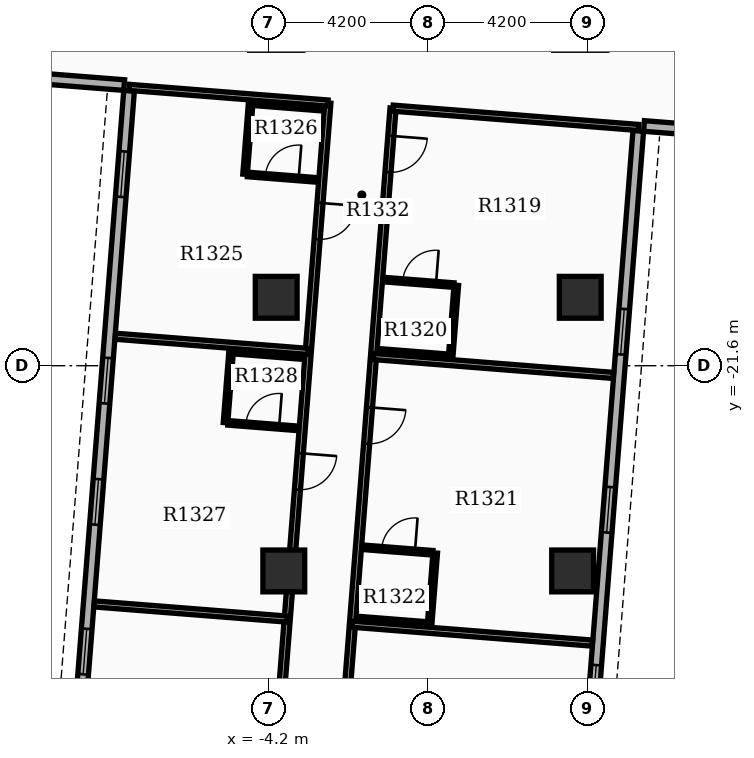
"""IFC4 building model, lengths in metres.
Left out: names, types, materials, properties, quantities, classifications, styles, units other than length and angle.
Written with IfcOpenShell. Run it as: python <this file> out.ifc"""

import sys

from ifc_helpers import new_model, si_unit, direction, frame, frame_2d, origin, origin_2d, place, context, subcontext, project, spatial, rectangle, extrude, element, fill, save


model = new_model("IFC4")
c1 = context("Model", 3, precision=1e-05, world=origin(), true_north=direction((0.0, 1.0)))
c2 = subcontext(c1, "Body", "Model", "MODEL_VIEW")
j1 = project(units=[si_unit("LENGTHUNIT", "METRE"), si_unit("PLANEANGLEUNIT", "RADIAN")], contexts=[c1])
p1 = place(None, origin())
s1 = spatial("IfcSite", under=j1, at=p1, CompositionType="ELEMENT")
p2 = place(p1, origin())
s2 = spatial("IfcBuilding", under=s1, at=p2, CompositionType="ELEMENT")
p3 = place(p2, frame((0.0, 0.0, 83.4)))
s3 = spatial("IfcBuildingStorey", under=s2, at=p3, CompositionType="ELEMENT", Elevation=83.4)
for number, where, z_axis, x_axis in (
    (1, (-4.0, -19.8, 0.0), (0.0, 0.0, 1.0), (1.0, 0.0, 0.0)),
    (2, (4.0, -19.8, 0.0), (0.0, 0.0, 1.0), (1.0, 0.0, 0.0)),
    (3, (-3.8, -27.0, 0.0), (0.0, 0.0, 1.0), (1.0, 0.0, 0.0)),
    (4, (3.8, -27.0, 0.0), (0.0, 0.0, 1.0), (1.0, 0.0, 0.0)),
):
    element("IfcColumn", number, at=place(p3, frame(where, z_axis=z_axis, x_axis=x_axis)), inside=s3, PredefinedType="COLUMN", context=c2, shape_type="SweptSolid", body=[
        extrude(rectangle(XDim=1.1, YDim=1.1, at=origin_2d()), origin(), (0.0, 0.0, 1.0), 3.9),
    ])
p4 = place(p3, frame((-7.872, -14.367, 0.0), z_axis=(0.0, 0.0, 1.0), x_axis=(-0.078452802979, -0.996917828963, 0.0)))
e5 = element("IfcWall", 5, at=p4, inside=s3, PredefinedType="STANDARD", context=c2, shape_type="SweptSolid", body=[
    extrude(rectangle(XDim=20.1, YDim=0.28, at=frame_2d((10.05, 0.0))), origin(), (0.0, 0.0, 1.0), 2.91),
])
p5 = place(p4, frame((1.6, 0.0, 0.8)))
e6 = element("IfcOpeningElement", 6, at=p5, cuts=e5, PredefinedType="OPENING", context=c2, shape_type="SweptSolid", body=[
    extrude(rectangle(XDim=1.2, YDim=1.6, at=frame_2d((0.6, 0.8))), frame((0.0, 0.15, 0.0), z_axis=(0.0, -1.0, 0.0), x_axis=(1.0, 0.0, 0.0)), (0.0, 0.0, 1.0), 0.3),
])
p6 = place(p4, frame((7.05, 0.0, 0.8)))
e7 = element("IfcOpeningElement", 7, at=p6, cuts=e5, PredefinedType="OPENING", context=c2, shape_type="SweptSolid", body=[
    extrude(rectangle(XDim=1.2, YDim=1.6, at=frame_2d((0.6, 0.8))), frame((0.0, 0.15, 0.0), z_axis=(0.0, -1.0, 0.0), x_axis=(1.0, 0.0, 0.0)), (0.0, 0.0, 1.0), 0.3),
])
p7 = place(p4, frame((10.25, 0.0, 0.8)))
e8 = element("IfcOpeningElement", 8, at=p7, cuts=e5, PredefinedType="OPENING", context=c2, shape_type="SweptSolid", body=[
    extrude(rectangle(XDim=1.2, YDim=1.6, at=frame_2d((0.6, 0.8))), frame((0.0, 0.15, 0.0), z_axis=(0.0, -1.0, 0.0), x_axis=(1.0, 0.0, 0.0)), (0.0, 0.0, 1.0), 0.3),
])
p8 = place(p4, frame((14.2, 0.0, 0.8)))
e9 = element("IfcOpeningElement", 9, at=p8, cuts=e5, PredefinedType="OPENING", context=c2, shape_type="SweptSolid", body=[
    extrude(rectangle(XDim=1.2, YDim=1.6, at=frame_2d((0.6, 0.8))), frame((0.0, 0.15, 0.0), z_axis=(0.0, -1.0, 0.0), x_axis=(1.0, 0.0, 0.0)), (0.0, 0.0, 1.0), 0.3),
])
p9 = place(p3, frame((3.95, -35.459, 0.0), z_axis=(0.0, 0.0, 1.0), x_axis=(0.078452802979, 0.996917828963, 0.0)))
e10 = element("IfcWall", 10, at=p9, inside=s3, PredefinedType="STANDARD", context=c2, shape_type="SweptSolid", body=[
    extrude(rectangle(XDim=20.1, YDim=0.28, at=frame_2d((10.05, 0.0))), origin(), (0.0, 0.0, 1.0), 2.91),
])
p10 = place(p9, frame((1.6, 0.0, 0.8)))
e11 = element("IfcOpeningElement", 11, at=p10, cuts=e10, PredefinedType="OPENING", context=c2, shape_type="SweptSolid", body=[
    extrude(rectangle(XDim=1.2, YDim=1.6, at=frame_2d((0.6, 0.8))), frame((0.0, 0.15, 0.0), z_axis=(0.0, -1.0, 0.0), x_axis=(1.0, 0.0, 0.0)), (0.0, 0.0, 1.0), 0.3),
])
p11 = place(p9, frame((4.8, 0.0, 0.8)))
e12 = element("IfcOpeningElement", 12, at=p11, cuts=e10, PredefinedType="OPENING", context=c2, shape_type="SweptSolid", body=[
    extrude(rectangle(XDim=1.2, YDim=1.6, at=frame_2d((0.6, 0.8))), frame((0.0, 0.15, 0.0), z_axis=(0.0, -1.0, 0.0), x_axis=(1.0, 0.0, 0.0)), (0.0, 0.0, 1.0), 0.3),
])
p12 = place(p9, frame((9.5, 0.0, 0.8)))
e13 = element("IfcOpeningElement", 13, at=p12, cuts=e10, PredefinedType="OPENING", context=c2, shape_type="SweptSolid", body=[
    extrude(rectangle(XDim=1.2, YDim=1.6, at=frame_2d((0.6, 0.8))), frame((0.0, 0.15, 0.0), z_axis=(0.0, -1.0, 0.0), x_axis=(1.0, 0.0, 0.0)), (0.0, 0.0, 1.0), 0.3),
])
p13 = place(p9, frame((14.2, 0.0, 0.8)))
e14 = element("IfcOpeningElement", 14, at=p13, cuts=e10, PredefinedType="OPENING", context=c2, shape_type="SweptSolid", body=[
    extrude(rectangle(XDim=1.2, YDim=1.6, at=frame_2d((0.6, 0.8))), frame((0.0, 0.15, 0.0), z_axis=(0.0, -1.0, 0.0), x_axis=(1.0, 0.0, 0.0)), (0.0, 0.0, 1.0), 0.3),
])
p14 = place(p3, frame((-14.281, -13.722, 0.0), z_axis=(0.0, 0.0, 1.0), x_axis=(0.99691915642, -0.078435932851, 0.0)))
e15 = element("IfcWall", 15, at=p14, inside=s3, PredefinedType="STANDARD", context=c2, shape_type="SweptSolid", body=[
    extrude(rectangle(XDim=6.3, YDim=0.28, at=frame_2d((3.15, 0.0))), origin(), (0.0, 0.0, 1.0), 2.91),
])
p15 = place(p3, frame((11.958, -15.787, 0.0), z_axis=(0.0, 0.0, 1.0), x_axis=(-0.996916125428, 0.078474447191, 0.0)))
e16 = element("IfcWall", 16, at=p15, inside=s3, PredefinedType="STANDARD", context=c2, shape_type="SweptSolid", body=[
    extrude(rectangle(XDim=6.3, YDim=0.28, at=frame_2d((3.15, 0.0))), origin(), (0.0, 0.0, 1.0), 2.91),
])
p16 = place(p3, frame((-0.926, -14.823, 0.0), z_axis=(0.0, 0.0, 1.0), x_axis=(-0.078460461943, -0.996917226209, 0.0)))
e17 = element("IfcWall", 17, at=p16, inside=s3, PredefinedType="PARTITIONING", context=c2, shape_type="SweptSolid", body=[
    extrude(rectangle(XDim=20.182, YDim=0.16, at=frame_2d((10.091, 0.0))), origin(), (0.0, 0.0, 1.0), 2.9),
])
p17 = place(p16, frame((0.731, 0.0, 0.0)))
e18 = element("IfcOpeningElement", 18, at=p17, cuts=e17, PredefinedType="OPENING", context=c2, shape_type="SweptSolid", body=[
    extrude(rectangle(XDim=0.96, YDim=2.15, at=frame_2d((0.48, 1.075))), frame((0.0, 0.09, 0.0), z_axis=(0.0, -1.0, 0.0), x_axis=(1.0, 0.0, 0.0)), (0.0, 0.0, 1.0), 0.18),
])
p18 = place(p16, frame((7.896, 0.0, 0.0)))
e19 = element("IfcOpeningElement", 19, at=p18, cuts=e17, PredefinedType="OPENING", context=c2, shape_type="SweptSolid", body=[
    extrude(rectangle(XDim=0.96, YDim=2.15, at=frame_2d((0.48, 1.075))), frame((0.0, 0.09, 0.0), z_axis=(0.0, -1.0, 0.0), x_axis=(1.0, 0.0, 0.0)), (0.0, 0.0, 1.0), 0.18),
])
p19 = place(p16, frame((16.611, 0.0, 0.0)))
e20 = element("IfcOpeningElement", 20, at=p19, cuts=e17, PredefinedType="OPENING", context=c2, shape_type="SweptSolid", body=[
    extrude(rectangle(XDim=0.96, YDim=2.15, at=frame_2d((0.48, 1.075))), frame((0.0, 0.09, 0.0), z_axis=(0.0, -1.0, 0.0), x_axis=(1.0, 0.0, 0.0)), (0.0, 0.0, 1.0), 0.18),
])
p20 = place(p3, frame((-0.926, -14.823, 0.0), z_axis=(0.0, 0.0, 1.0), x_axis=(0.99691570434, -0.078479796377, 0.0)))
e21 = element("IfcWall", 21, at=p20, inside=s3, PredefinedType="PARTITIONING", context=c2, shape_type="SweptSolid", body=[
    extrude(rectangle(XDim=6.48, YDim=0.16, at=frame_2d((3.24, 0.0))), origin(), (0.0, 0.0, 1.0), 2.9),
])
p21 = place(p3, frame((-1.44, -21.359, 0.0), z_axis=(0.0, 0.0, 1.0), x_axis=(0.996917066323, -0.078462493424, 0.0)))
e22 = element("IfcWall", 22, at=p21, inside=s3, PredefinedType="PARTITIONING", context=c2, shape_type="SweptSolid", body=[
    extrude(rectangle(XDim=6.332, YDim=0.16, at=frame_2d((3.166, 0.0))), origin(), (0.0, 0.0, 1.0), 2.9),
])
p22 = place(p3, frame((-1.141, -19.336, 0.0), z_axis=(0.0, 0.0, 1.0), x_axis=(0.996916400774, -0.0784709492, 0.0)))
e23 = element("IfcWall", 23, at=p22, inside=s3, PredefinedType="PARTITIONING", context=c2, shape_type="SweptSolid", body=[
    extrude(rectangle(XDim=1.82, YDim=0.12, at=frame_2d((0.91, 0.0))), origin(), (0.0, 0.0, 1.0), 2.9),
])
p23 = place(p22, frame((0.47, 0.0, 0.0)))
e24 = element("IfcOpeningElement", 24, at=p23, cuts=e23, PredefinedType="OPENING", context=c2, shape_type="SweptSolid", body=[
    extrude(rectangle(XDim=0.88, YDim=2.1, at=frame_2d((0.44, 1.05))), frame((0.0, 0.07, 0.0), z_axis=(0.0, -1.0, 0.0), x_axis=(1.0, 0.0, 0.0)), (0.0, 0.0, 1.0), 0.14),
])
p24 = place(p3, frame((-1.288, -21.21, 0.0), z_axis=(0.0, 0.0, 1.0), x_axis=(0.996916400774, -0.0784709492, 0.0)))
e25 = element("IfcWall", 25, at=p24, inside=s3, PredefinedType="PARTITIONING", context=c2, shape_type="SweptSolid", body=[
    extrude(rectangle(XDim=1.82, YDim=0.12, at=frame_2d((0.91, 0.0))), origin(), (0.0, 0.0, 1.0), 2.9),
])
p25 = place(p3, frame((0.739, -19.484, 0.0), z_axis=(0.0, 0.0, 1.0), x_axis=(-0.07843418698, -0.996919293781, 0.0)))
e26 = element("IfcWall", 26, at=p25, inside=s3, PredefinedType="PARTITIONING", context=c2, shape_type="SweptSolid", body=[
    extrude(rectangle(XDim=1.88, YDim=0.12, at=frame_2d((0.94, 0.0))), origin(), (0.0, 0.0, 1.0), 2.9),
])
p26 = place(p3, frame((-1.994, -28.402, 0.0), z_axis=(0.0, 0.0, 1.0), x_axis=(0.996916828941, -0.078465509453, 0.0)))
e27 = element("IfcWall", 27, at=p26, inside=s3, PredefinedType="PARTITIONING", context=c2, shape_type="SweptSolid", body=[
    extrude(rectangle(XDim=6.332, YDim=0.16, at=frame_2d((3.166, 0.0))), origin(), (0.0, 0.0, 1.0), 2.9),
])
p27 = place(p3, frame((-1.695, -26.379, 0.0), z_axis=(0.0, 0.0, 1.0), x_axis=(0.996915574626, -0.078481444107, 0.0)))
e28 = element("IfcWall", 28, at=p27, inside=s3, PredefinedType="PARTITIONING", context=c2, shape_type="SweptSolid", body=[
    extrude(rectangle(XDim=1.82, YDim=0.12, at=frame_2d((0.91, 0.0))), origin(), (0.0, 0.0, 1.0), 2.9),
])
p28 = place(p27, frame((0.47, 0.0, 0.0)))
e29 = element("IfcOpeningElement", 29, at=p28, cuts=e28, PredefinedType="OPENING", context=c2, shape_type="SweptSolid", body=[
    extrude(rectangle(XDim=0.88, YDim=2.1, at=frame_2d((0.44, 1.05))), frame((0.0, 0.07, 0.0), z_axis=(0.0, -1.0, 0.0), x_axis=(1.0, 0.0, 0.0)), (0.0, 0.0, 1.0), 0.14),
])
p29 = place(p3, frame((-1.842, -28.253, 0.0), z_axis=(0.0, 0.0, 1.0), x_axis=(0.996915574626, -0.078481444107, 0.0)))
e30 = element("IfcWall", 30, at=p29, inside=s3, PredefinedType="PARTITIONING", context=c2, shape_type="SweptSolid", body=[
    extrude(rectangle(XDim=1.82, YDim=0.12, at=frame_2d((0.91, 0.0))), origin(), (0.0, 0.0, 1.0), 2.9),
])
p30 = place(p3, frame((0.184, -26.527, 0.0), z_axis=(0.0, 0.0, 1.0), x_axis=(-0.07843418698, -0.996919293781, 0.0)))
e31 = element("IfcWall", 31, at=p30, inside=s3, PredefinedType="PARTITIONING", context=c2, shape_type="SweptSolid", body=[
    extrude(rectangle(XDim=1.88, YDim=0.12, at=frame_2d((0.94, 0.0))), origin(), (0.0, 0.0, 1.0), 2.9),
])
p31 = place(p3, frame((-2.641, -14.688, 0.0), z_axis=(0.0, 0.0, 1.0), x_axis=(-0.078460461943, -0.996917226209, 0.0)))
e32 = element("IfcWall", 32, at=p31, inside=s3, PredefinedType="PARTITIONING", context=c2, shape_type="SweptSolid", body=[
    extrude(rectangle(XDim=20.182, YDim=0.16, at=frame_2d((10.091, 0.0))), origin(), (0.0, 0.0, 1.0), 2.9),
])
p32 = place(p31, frame((2.636, 0.0, 0.0)))
e33 = element("IfcOpeningElement", 33, at=p32, cuts=e32, PredefinedType="OPENING", context=c2, shape_type="SweptSolid", body=[
    extrude(rectangle(XDim=0.96, YDim=2.15, at=frame_2d((0.48, 1.075))), frame((0.0, 0.09, 0.0), z_axis=(0.0, -1.0, 0.0), x_axis=(1.0, 0.0, 0.0)), (0.0, 0.0, 1.0), 0.18),
])
p33 = place(p31, frame((9.243, 0.0, 0.0)))
e34 = element("IfcOpeningElement", 34, at=p33, cuts=e32, PredefinedType="OPENING", context=c2, shape_type="SweptSolid", body=[
    extrude(rectangle(XDim=0.96, YDim=2.15, at=frame_2d((0.48, 1.075))), frame((0.0, 0.09, 0.0), z_axis=(0.0, -1.0, 0.0), x_axis=(1.0, 0.0, 0.0)), (0.0, 0.0, 1.0), 0.18),
])
p34 = place(p31, frame((16.611, 0.0, 0.0)))
e35 = element("IfcOpeningElement", 35, at=p34, cuts=e32, PredefinedType="OPENING", context=c2, shape_type="SweptSolid", body=[
    extrude(rectangle(XDim=0.96, YDim=2.15, at=frame_2d((0.48, 1.075))), frame((0.0, 0.09, 0.0), z_axis=(0.0, -1.0, 0.0), x_axis=(1.0, 0.0, 0.0)), (0.0, 0.0, 1.0), 0.18),
])
p35 = place(p3, frame((-2.641, -14.688, 0.0), z_axis=(0.0, 0.0, 1.0), x_axis=(-0.996920905616, 0.078413697441, 0.0)))
e36 = element("IfcWall", 36, at=p35, inside=s3, PredefinedType="PARTITIONING", context=c2, shape_type="SweptSolid", body=[
    extrude(rectangle(XDim=5.24, YDim=0.16, at=frame_2d((2.62, 0.0))), origin(), (0.0, 0.0, 1.0), 2.9),
])
p36 = place(p3, frame((-3.155, -21.224, 0.0), z_axis=(0.0, 0.0, 1.0), x_axis=(-0.996919000774, 0.078437911089, 0.0)))
e37 = element("IfcWall", 37, at=p36, inside=s3, PredefinedType="PARTITIONING", context=c2, shape_type="SweptSolid", body=[
    extrude(rectangle(XDim=5.092, YDim=0.16, at=frame_2d((2.546, 0.0))), origin(), (0.0, 0.0, 1.0), 2.9),
])
p37 = place(p3, frame((-4.755, -16.568, 0.0), z_axis=(0.0, 0.0, 1.0), x_axis=(0.996926885478, -0.078337634704, 0.0)))
e38 = element("IfcWall", 38, at=p37, inside=s3, PredefinedType="PARTITIONING", context=c2, shape_type="SweptSolid", body=[
    extrude(rectangle(XDim=1.82, YDim=0.12, at=frame_2d((0.91, 0.0))), origin(), (0.0, 0.0, 1.0), 2.9),
])
p38 = place(p37, frame((0.47, 0.0, 0.0)))
e39 = element("IfcOpeningElement", 39, at=p38, cuts=e38, PredefinedType="OPENING", context=c2, shape_type="SweptSolid", body=[
    extrude(rectangle(XDim=0.88, YDim=2.1, at=frame_2d((0.44, 1.05))), frame((0.0, 0.07, 0.0), z_axis=(0.0, -1.0, 0.0), x_axis=(1.0, 0.0, 0.0)), (0.0, 0.0, 1.0), 0.14),
])
p39 = place(p3, frame((-4.607, -14.694, 0.0), z_axis=(0.0, 0.0, 1.0), x_axis=(0.996916400774, -0.0784709492, 0.0)))
e40 = element("IfcWall", 40, at=p39, inside=s3, PredefinedType="PARTITIONING", context=c2, shape_type="SweptSolid", body=[
    extrude(rectangle(XDim=1.82, YDim=0.12, at=frame_2d((0.91, 0.0))), origin(), (0.0, 0.0, 1.0), 2.9),
])
p40 = place(p3, frame((-4.672, -14.689, 0.0), z_axis=(0.0, 0.0, 1.0), x_axis=(-0.07843418698, -0.996919293781, 0.0)))
e41 = element("IfcWall", 41, at=p40, inside=s3, PredefinedType="PARTITIONING", context=c2, shape_type="SweptSolid", body=[
    extrude(rectangle(XDim=1.88, YDim=0.12, at=frame_2d((0.94, 0.0))), origin(), (0.0, 0.0, 1.0), 2.9),
])
p41 = place(p3, frame((-3.709, -28.267, 0.0), z_axis=(0.0, 0.0, 1.0), x_axis=(-0.996919000774, 0.078437911089, 0.0)))
e42 = element("IfcWall", 42, at=p41, inside=s3, PredefinedType="PARTITIONING", context=c2, shape_type="SweptSolid", body=[
    extrude(rectangle(XDim=5.092, YDim=0.16, at=frame_2d((2.546, 0.0))), origin(), (0.0, 0.0, 1.0), 2.9),
])
p42 = place(p3, frame((-5.269, -23.104, 0.0), z_axis=(0.0, 0.0, 1.0), x_axis=(0.996915574626, -0.078481444107, 0.0)))
e43 = element("IfcWall", 43, at=p42, inside=s3, PredefinedType="PARTITIONING", context=c2, shape_type="SweptSolid", body=[
    extrude(rectangle(XDim=1.82, YDim=0.12, at=frame_2d((0.91, 0.0))), origin(), (0.0, 0.0, 1.0), 2.9),
])
p43 = place(p42, frame((0.47, 0.0, 0.0)))
e44 = element("IfcOpeningElement", 44, at=p43, cuts=e43, PredefinedType="OPENING", context=c2, shape_type="SweptSolid", body=[
    extrude(rectangle(XDim=0.88, YDim=2.1, at=frame_2d((0.44, 1.05))), frame((0.0, 0.07, 0.0), z_axis=(0.0, -1.0, 0.0), x_axis=(1.0, 0.0, 0.0)), (0.0, 0.0, 1.0), 0.14),
])
p44 = place(p3, frame((-5.121, -21.229, 0.0), z_axis=(0.0, 0.0, 1.0), x_axis=(0.996915574626, -0.078481444107, 0.0)))
e45 = element("IfcWall", 45, at=p44, inside=s3, PredefinedType="PARTITIONING", context=c2, shape_type="SweptSolid", body=[
    extrude(rectangle(XDim=1.82, YDim=0.12, at=frame_2d((0.91, 0.0))), origin(), (0.0, 0.0, 1.0), 2.9),
])
p45 = place(p3, frame((-5.186, -21.225, 0.0), z_axis=(0.0, 0.0, 1.0), x_axis=(-0.078444342213, -0.99691849475, 0.0)))
e46 = element("IfcWall", 46, at=p45, inside=s3, PredefinedType="PARTITIONING", context=c2, shape_type="SweptSolid", body=[
    extrude(rectangle(XDim=1.88, YDim=0.12, at=frame_2d((0.94, 0.0))), origin(), (0.0, 0.0, 1.0), 2.9),
])
p46 = place(p5, origin())
e47 = element("IfcWindow", 47, at=p46, inside=s3, PartitioningType="SINGLE_PANEL", PredefinedType="WINDOW", context=c2, shape_type="SweptSolid", body=[
    extrude(rectangle(XDim=1.2, YDim=1.6, at=frame_2d((0.6, 0.8))), frame((0.0, 0.03, 0.0), z_axis=(0.0, -1.0, 0.0), x_axis=(1.0, 0.0, 0.0)), (0.0, 0.0, 1.0), 0.06),
])
fill(e6, e47)
p47 = place(p6, origin())
e48 = element("IfcWindow", 48, at=p47, inside=s3, PartitioningType="SINGLE_PANEL", PredefinedType="WINDOW", context=c2, shape_type="SweptSolid", body=[
    extrude(rectangle(XDim=1.2, YDim=1.6, at=frame_2d((0.6, 0.8))), frame((0.0, 0.03, 0.0), z_axis=(0.0, -1.0, 0.0), x_axis=(1.0, 0.0, 0.0)), (0.0, 0.0, 1.0), 0.06),
])
fill(e7, e48)
p48 = place(p7, origin())
e49 = element("IfcWindow", 49, at=p48, inside=s3, PartitioningType="SINGLE_PANEL", PredefinedType="WINDOW", context=c2, shape_type="SweptSolid", body=[
    extrude(rectangle(XDim=1.2, YDim=1.6, at=frame_2d((0.6, 0.8))), frame((0.0, 0.03, 0.0), z_axis=(0.0, -1.0, 0.0), x_axis=(1.0, 0.0, 0.0)), (0.0, 0.0, 1.0), 0.06),
])
fill(e8, e49)
p49 = place(p8, origin())
e50 = element("IfcWindow", 50, at=p49, inside=s3, PartitioningType="SINGLE_PANEL", PredefinedType="WINDOW", context=c2, shape_type="SweptSolid", body=[
    extrude(rectangle(XDim=1.2, YDim=1.6, at=frame_2d((0.6, 0.8))), frame((0.0, 0.03, 0.0), z_axis=(0.0, -1.0, 0.0), x_axis=(1.0, 0.0, 0.0)), (0.0, 0.0, 1.0), 0.06),
])
fill(e9, e50)
p50 = place(p11, origin())
e51 = element("IfcWindow", 51, at=p50, inside=s3, PartitioningType="SINGLE_PANEL", PredefinedType="WINDOW", context=c2, shape_type="SweptSolid", body=[
    extrude(rectangle(XDim=1.2, YDim=1.6, at=frame_2d((0.6, 0.8))), frame((0.0, 0.03, 0.0), z_axis=(0.0, -1.0, 0.0), x_axis=(1.0, 0.0, 0.0)), (0.0, 0.0, 1.0), 0.06),
])
fill(e12, e51)
p51 = place(p12, origin())
e52 = element("IfcWindow", 52, at=p51, inside=s3, PartitioningType="SINGLE_PANEL", PredefinedType="WINDOW", context=c2, shape_type="SweptSolid", body=[
    extrude(rectangle(XDim=1.2, YDim=1.6, at=frame_2d((0.6, 0.8))), frame((0.0, 0.03, 0.0), z_axis=(0.0, -1.0, 0.0), x_axis=(1.0, 0.0, 0.0)), (0.0, 0.0, 1.0), 0.06),
])
fill(e13, e52)
p52 = place(p13, origin())
e53 = element("IfcWindow", 53, at=p52, inside=s3, PartitioningType="SINGLE_PANEL", PredefinedType="WINDOW", context=c2, shape_type="SweptSolid", body=[
    extrude(rectangle(XDim=1.2, YDim=1.6, at=frame_2d((0.6, 0.8))), frame((0.0, 0.03, 0.0), z_axis=(0.0, -1.0, 0.0), x_axis=(1.0, 0.0, 0.0)), (0.0, 0.0, 1.0), 0.06),
])
fill(e14, e53)
p53 = place(p17, origin())
e54 = element("IfcDoor", 54, at=p53, inside=s3, OperationType="SINGLE_SWING_LEFT", PredefinedType="DOOR", context=c2, shape_type="SweptSolid", body=[
    extrude(rectangle(XDim=0.96, YDim=2.15, at=frame_2d((0.48, 1.075))), frame((0.0, 0.025, 0.0), z_axis=(0.0, -1.0, 0.0), x_axis=(1.0, 0.0, 0.0)), (0.0, 0.0, 1.0), 0.05),
])
fill(e18, e54)
p54 = place(p23, origin())
e55 = element("IfcDoor", 55, at=p54, inside=s3, OperationType="SINGLE_SWING_RIGHT", PredefinedType="DOOR", context=c2, shape_type="SweptSolid", body=[
    extrude(rectangle(XDim=0.88, YDim=2.1, at=frame_2d((0.44, 1.05))), frame((0.0, 0.025, 0.0), z_axis=(0.0, -1.0, 0.0), x_axis=(1.0, 0.0, 0.0)), (0.0, 0.0, 1.0), 0.05),
])
fill(e24, e55)
p55 = place(p18, origin())
e56 = element("IfcDoor", 56, at=p55, inside=s3, OperationType="SINGLE_SWING_LEFT", PredefinedType="DOOR", context=c2, shape_type="SweptSolid", body=[
    extrude(rectangle(XDim=0.96, YDim=2.15, at=frame_2d((0.48, 1.075))), frame((0.0, 0.025, 0.0), z_axis=(0.0, -1.0, 0.0), x_axis=(1.0, 0.0, 0.0)), (0.0, 0.0, 1.0), 0.05),
])
fill(e19, e56)
p56 = place(p28, origin())
e57 = element("IfcDoor", 57, at=p56, inside=s3, OperationType="SINGLE_SWING_RIGHT", PredefinedType="DOOR", context=c2, shape_type="SweptSolid", body=[
    extrude(rectangle(XDim=0.88, YDim=2.1, at=frame_2d((0.44, 1.05))), frame((0.0, 0.025, 0.0), z_axis=(0.0, -1.0, 0.0), x_axis=(1.0, 0.0, 0.0)), (0.0, 0.0, 1.0), 0.05),
])
fill(e29, e57)
p57 = place(p32, origin())
e58 = element("IfcDoor", 58, at=p57, inside=s3, OperationType="SINGLE_SWING_LEFT", PredefinedType="DOOR", context=c2, shape_type="SweptSolid", body=[
    extrude(rectangle(XDim=0.96, YDim=2.15, at=frame_2d((0.48, 1.075))), frame((0.0, 0.025, 0.0), z_axis=(0.0, -1.0, 0.0), x_axis=(1.0, 0.0, 0.0)), (0.0, 0.0, 1.0), 0.05),
])
fill(e33, e58)
p58 = place(p38, origin())
e59 = element("IfcDoor", 59, at=p58, inside=s3, OperationType="SINGLE_SWING_RIGHT", PredefinedType="DOOR", context=c2, shape_type="SweptSolid", body=[
    extrude(rectangle(XDim=0.88, YDim=2.1, at=frame_2d((0.44, 1.05))), frame((0.0, 0.025, 0.0), z_axis=(0.0, -1.0, 0.0), x_axis=(1.0, 0.0, 0.0)), (0.0, 0.0, 1.0), 0.05),
])
fill(e39, e59)
p59 = place(p33, origin())
e60 = element("IfcDoor", 60, at=p59, inside=s3, OperationType="SINGLE_SWING_LEFT", PredefinedType="DOOR", context=c2, shape_type="SweptSolid", body=[
    extrude(rectangle(XDim=0.96, YDim=2.15, at=frame_2d((0.48, 1.075))), frame((0.0, 0.025, 0.0), z_axis=(0.0, -1.0, 0.0), x_axis=(1.0, 0.0, 0.0)), (0.0, 0.0, 1.0), 0.05),
])
fill(e34, e60)
p60 = place(p43, origin())
e61 = element("IfcDoor", 61, at=p60, inside=s3, OperationType="SINGLE_SWING_RIGHT", PredefinedType="DOOR", context=c2, shape_type="SweptSolid", body=[
    extrude(rectangle(XDim=0.88, YDim=2.1, at=frame_2d((0.44, 1.05))), frame((0.0, 0.025, 0.0), z_axis=(0.0, -1.0, 0.0), x_axis=(1.0, 0.0, 0.0)), (0.0, 0.0, 1.0), 0.05),
])
fill(e44, e61)
save(model, sys.argv[1])
